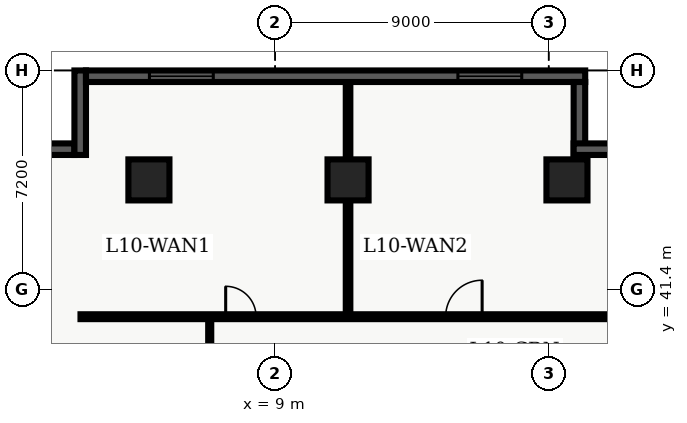
"""IFC4 building model, lengths in metres.
Left out: names, types, materials, properties, quantities, classifications, styles, units other than length and angle.
Written with IfcOpenShell. Run it as: python <this file> out.ifc"""

import sys

from ifc_helpers import new_model, entity, si_unit, converted_unit, direction, frame, origin_with_axes, origin_2d_with_axis, place, context, subcontext, project, spatial, polyline, rectangle, outline, extrude, element, fill, save


model = new_model("IFC4")
c1 = context("Model", 3, precision=1e-05, world=origin_with_axes(), true_north=direction((0.0, 1.0)))
c2 = subcontext(c1, "Body", "Model", "MODEL_VIEW")
j1 = project(units=[si_unit("LENGTHUNIT", "METRE"), converted_unit("PLANEANGLEUNIT", "DEGREE", entity("IfcPlaneAngleMeasure", 0.017), si_unit("PLANEANGLEUNIT", "RADIAN"), dimensions=[0, 0, 0, 0, 0, 0, 0])], contexts=[c1])
p1 = place(None, origin_with_axes())
s1 = spatial("IfcSite", under=j1, at=p1, CompositionType="ELEMENT")
p2 = place(p1, origin_with_axes())
s2 = spatial("IfcBuilding", under=s1, at=p2, CompositionType="ELEMENT")
p3 = place(p2, frame((0.0, 0.0, 44.4), z_axis=(0.0, 0.0, 1.0), x_axis=(1.0, 0.0, 0.0)))
s3 = spatial("IfcBuildingStorey", under=s2, at=p3, CompositionType="ELEMENT", Elevation=44.4)
for number, where, z_axis, x_axis in (
    (1, (11.4, 45.0, 0.0), (0.0, 0.0, 1.0), (1.0, 0.0, 0.0)),
    (2, (18.6, 45.0, 0.0), (0.0, 0.0, 1.0), (1.0, 0.0, 0.0)),
    (3, (4.85, 45.0, 0.0), (0.0, 0.0, 1.0), (1.0, 0.0, 0.0)),
):
    element("IfcColumn", number, at=place(p3, frame(where, z_axis=z_axis, x_axis=x_axis)), inside=s3, PredefinedType="COLUMN", context=c2, shape_type="SweptSolid", body=[
        extrude(rectangle(XDim=1.35, YDim=1.35, at=origin_2d_with_axis()), origin_with_axes(), (0.0, 0.0, 1.0), 3.9),
    ])
p4 = place(p3, frame((2.6, 40.5, 0.0), z_axis=(0.0, 0.0, 1.0), x_axis=(1.0, 0.0, 0.0)))
e4 = element("IfcWall", 4, at=p4, inside=s3, PredefinedType="PARTITIONING", context=c2, shape_type="SweptSolid", body=[
    extrude(outline(polyline([(0.0, -0.08), (18.65, -0.08), (18.65, 0.08), (0.0, 0.08), (0.0, -0.08)])), origin_with_axes(), (0.0, 0.0, 1.0), 2.7),
])
p5 = place(p4, frame((5.275, 0.0, 0.0), z_axis=(0.0, 0.0, 1.0), x_axis=(1.0, 0.0, 0.0)))
e5 = element("IfcOpeningElement", 5, at=p5, cuts=e4, PredefinedType="OPENING", context=c2, shape_type="SweptSolid", body=[
    extrude(rectangle(XDim=1.0, YDim=0.18, at=origin_2d_with_axis()), origin_with_axes(), (0.0, 0.0, 1.0), 2.15),
])
p6 = place(p4, frame((12.61, 0.0, 0.0), z_axis=(0.0, 0.0, 1.0), x_axis=(1.0, 0.0, 0.0)))
e6 = element("IfcOpeningElement", 6, at=p6, cuts=e4, PredefinedType="OPENING", context=c2, shape_type="SweptSolid", body=[
    extrude(rectangle(XDim=1.2, YDim=0.18, at=origin_2d_with_axis()), origin_with_axes(), (0.0, 0.0, 1.0), 2.2),
])
p7 = place(p3, frame((6.85, 7.8, 0.0), z_axis=(0.0, 0.0, 1.0), x_axis=(0.0, 1.0, 0.0)))
e7 = element("IfcWall", 7, at=p7, inside=s3, PredefinedType="PARTITIONING", context=c2, shape_type="SweptSolid", body=[
    extrude(outline(polyline([(0.0, -0.05), (32.7, -0.05), (32.7, 0.05), (0.0, 0.05), (0.0, -0.05)])), origin_with_axes(), (0.0, 0.0, 1.0), 2.7),
])
p8 = place(p7, frame((4.6, 0.0, 0.0), z_axis=(0.0, 0.0, 1.0), x_axis=(1.0, 0.0, 0.0)))
e8 = element("IfcOpeningElement", 8, at=p8, cuts=e7, PredefinedType="OPENING", context=c2, shape_type="SweptSolid", body=[
    extrude(rectangle(XDim=1.0, YDim=0.12, at=origin_2d_with_axis()), origin_with_axes(), (0.0, 0.0, 1.0), 2.15),
])
p9 = place(p7, frame((9.235, 0.0, 0.0), z_axis=(0.0, 0.0, 1.0), x_axis=(1.0, 0.0, 0.0)))
e9 = element("IfcOpeningElement", 9, at=p9, cuts=e7, PredefinedType="OPENING", context=c2, shape_type="SweptSolid", body=[
    extrude(rectangle(XDim=1.0, YDim=0.12, at=origin_2d_with_axis()), origin_with_axes(), (0.0, 0.0, 1.0), 2.15),
])
p10 = place(p7, frame((17.974, 0.0, 0.0), z_axis=(0.0, 0.0, 1.0), x_axis=(1.0, 0.0, 0.0)))
e10 = element("IfcOpeningElement", 10, at=p10, cuts=e7, PredefinedType="OPENING", context=c2, shape_type="SweptSolid", body=[
    extrude(rectangle(XDim=1.0, YDim=0.12, at=origin_2d_with_axis()), origin_with_axes(), (0.0, 0.0, 1.0), 2.15),
])
p11 = place(p7, frame((27.029, 0.0, 0.0), z_axis=(0.0, 0.0, 1.0), x_axis=(1.0, 0.0, 0.0)))
e11 = element("IfcOpeningElement", 11, at=p11, cuts=e7, PredefinedType="OPENING", context=c2, shape_type="SweptSolid", body=[
    extrude(rectangle(XDim=1.0, YDim=0.12, at=origin_2d_with_axis()), origin_with_axes(), (0.0, 0.0, 1.0), 2.15),
])
p12 = place(p3, frame((11.4, 40.6, 0.0), z_axis=(0.0, 0.0, 1.0), x_axis=(0.0, 1.0, 0.0)))
e12 = element("IfcWall", 12, at=p12, inside=s3, PredefinedType="PARTITIONING", context=c2, shape_type="SweptSolid", body=[
    extrude(outline(polyline([(0.0, -0.075), (7.64, -0.075), (7.64, 0.075), (0.0, 0.075), (0.0, -0.075)])), origin_with_axes(), (0.0, 0.0, 1.0), 2.7),
])
p13 = place(p3, frame((0.38, 46.01, 0.0), z_axis=(0.0, 0.0, 1.0), x_axis=(1.0, 0.0, 0.0)))
e13 = element("IfcWall", 13, at=p13, inside=s3, PredefinedType="SOLIDWALL", context=c2, shape_type="SweptSolid", body=[
    extrude(outline(polyline([(0.0, -0.19), (2.02, -0.19), (2.02, 0.19), (0.0, 0.19), (0.0, -0.19)])), origin_with_axes(), (0.0, 0.0, 1.0), 3.66),
])
p14 = place(p3, frame((2.59, 45.82, 0.0), z_axis=(0.0, 0.0, 1.0), x_axis=(0.0, 1.0, 0.0)))
e14 = element("IfcWall", 14, at=p14, inside=s3, PredefinedType="SOLIDWALL", context=c2, shape_type="SweptSolid", body=[
    extrude(outline(polyline([(0.0, -0.19), (2.78, -0.19), (2.78, 0.19), (0.0, 0.19), (0.0, -0.19)])), origin_with_axes(), (0.0, 0.0, 1.0), 3.66),
])
p15 = place(p3, frame((2.78, 48.41, 0.0), z_axis=(0.0, 0.0, 1.0), x_axis=(1.0, 0.0, 0.0)))
e15 = element("IfcWall", 15, at=p15, inside=s3, PredefinedType="SOLIDWALL", context=c2, shape_type="SweptSolid", body=[
    extrude(outline(polyline([(0.0, -0.19), (16.42, -0.19), (16.42, 0.19), (0.0, 0.19), (0.0, -0.19)])), origin_with_axes(), (0.0, 0.0, 1.0), 3.66),
])
p16 = place(p15, frame((3.137, 0.0, 0.45), z_axis=(0.0, 0.0, 1.0), x_axis=(1.0, 0.0, 0.0)))
e16 = element("IfcOpeningElement", 16, at=p16, cuts=e15, PredefinedType="OPENING", context=c2, shape_type="SweptSolid", body=[
    extrude(rectangle(XDim=2.1, YDim=0.4, at=origin_2d_with_axis()), origin_with_axes(), (0.0, 0.0, 1.0), 2.2),
])
p17 = place(p15, frame((13.283, 0.0, 0.45), z_axis=(0.0, 0.0, 1.0), x_axis=(1.0, 0.0, 0.0)))
e17 = element("IfcOpeningElement", 17, at=p17, cuts=e15, PredefinedType="OPENING", context=c2, shape_type="SweptSolid", body=[
    extrude(rectangle(XDim=2.1, YDim=0.4, at=origin_2d_with_axis()), origin_with_axes(), (0.0, 0.0, 1.0), 2.2),
])
p18 = place(p3, frame((19.01, 48.22, 0.0), z_axis=(0.0, 0.0, 1.0), x_axis=(0.0, -1.0, 0.0)))
e18 = element("IfcWall", 18, at=p18, inside=s3, PredefinedType="SOLIDWALL", context=c2, shape_type="SweptSolid", body=[
    extrude(outline(polyline([(0.0, -0.19), (2.56, -0.19), (2.56, 0.19), (0.0, 0.19), (0.0, -0.19)])), origin_with_axes(), (0.0, 0.0, 1.0), 3.66),
])
p19 = place(p3, frame((18.82, 46.01, 0.0), z_axis=(0.0, 0.0, 1.0), x_axis=(1.0, 0.0, 0.0)))
e19 = element("IfcWall", 19, at=p19, inside=s3, PredefinedType="SOLIDWALL", context=c2, shape_type="SweptSolid", body=[
    extrude(outline(polyline([(0.0, -0.19), (2.78, -0.19), (2.78, 0.19), (0.0, 0.19), (0.0, -0.19)])), origin_with_axes(), (0.0, 0.0, 1.0), 3.66),
])
p20 = place(p4, frame((5.275, 0.0, 0.0), z_axis=(0.0, 0.0, 1.0), x_axis=(1.0, 0.0, 0.0)))
e20 = element("IfcDoor", 20, at=p20, inside=s3, OperationType="SINGLE_SWING_LEFT", PredefinedType="DOOR", context=c2, shape_type="SweptSolid", body=[
    extrude(rectangle(XDim=1.0, YDim=0.09, at=origin_2d_with_axis()), origin_with_axes(), (0.0, 0.0, 1.0), 2.15),
])
fill(e5, e20)
p21 = place(p4, frame((12.61, 0.0, 0.0), z_axis=(0.0, 0.0, 1.0), x_axis=(1.0, 0.0, 0.0)))
e21 = element("IfcDoor", 21, at=p21, inside=s3, OperationType="SINGLE_SWING_RIGHT", PredefinedType="DOOR", context=c2, shape_type="SweptSolid", body=[
    extrude(rectangle(XDim=1.2, YDim=0.09, at=origin_2d_with_axis()), origin_with_axes(), (0.0, 0.0, 1.0), 2.2),
])
fill(e6, e21)
p22 = place(p15, frame((3.137, 0.0, 0.45), z_axis=(0.0, 0.0, 1.0), x_axis=(1.0, 0.0, 0.0)))
e22 = element("IfcWindow", 22, at=p22, inside=s3, PredefinedType="WINDOW", context=c2, shape_type="SweptSolid", body=[
    extrude(rectangle(XDim=2.1, YDim=0.09, at=origin_2d_with_axis()), origin_with_axes(), (0.0, 0.0, 1.0), 2.2),
])
fill(e16, e22)
p23 = place(p15, frame((13.283, 0.0, 0.45), z_axis=(0.0, 0.0, 1.0), x_axis=(1.0, 0.0, 0.0)))
e23 = element("IfcWindow", 23, at=p23, inside=s3, PredefinedType="WINDOW", context=c2, shape_type="SweptSolid", body=[
    extrude(rectangle(XDim=2.1, YDim=0.09, at=origin_2d_with_axis()), origin_with_axes(), (0.0, 0.0, 1.0), 2.2),
])
fill(e17, e23)
save(model, sys.argv[1])
